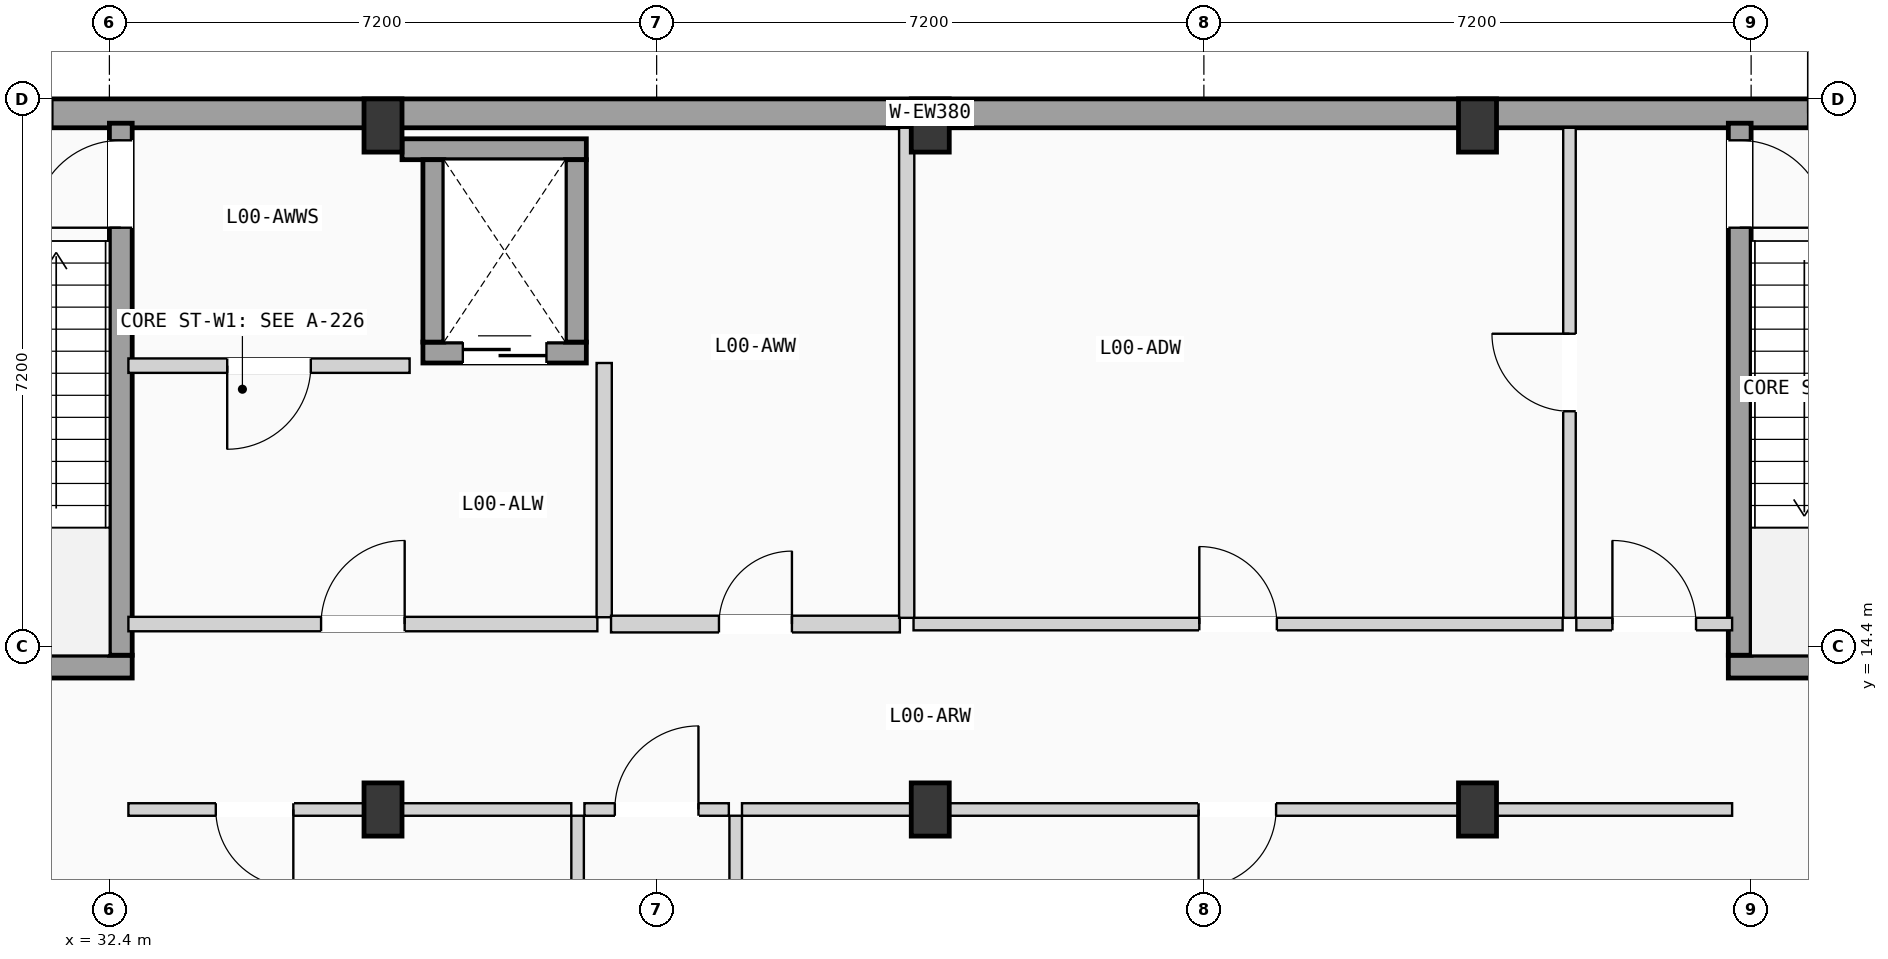
"""IFC4 building model, lengths in metres.
Left out: names, types, materials, properties, quantities, classifications, styles, units other than length and angle.
Written with IfcOpenShell. Run it as: python <this file> out.ifc"""

import sys

from ifc_helpers import new_model, si_unit, direction, frame, frame_2d, origin, origin_2d, place, context, subcontext, project, spatial, rectangle, extrude, element, fill, save


model = new_model("IFC4")
c1 = context("Model", 3, precision=1e-05, world=origin(), true_north=direction((0.0, 1.0)))
c2 = subcontext(c1, "Body", "Model", "MODEL_VIEW")
j1 = project(units=[si_unit("LENGTHUNIT", "METRE"), si_unit("PLANEANGLEUNIT", "RADIAN")], contexts=[c1])
p1 = place(None, origin())
s1 = spatial("IfcSite", under=j1, at=p1, CompositionType="ELEMENT")
p2 = place(p1, origin())
s2 = spatial("IfcBuilding", under=s1, at=p2, CompositionType="ELEMENT")
p3 = place(p2, origin())
s3 = spatial("IfcBuildingStorey", under=s2, at=p3, CompositionType="ELEMENT", Elevation=0.0)
for number, where, z_axis, x_axis in (
    (1, (36.0, 12.25, 0.0), (0.0, 0.0, 1.0), (1.0, 0.0, 0.0)),
    (2, (36.0, 21.25, 0.0), (0.0, 0.0, 1.0), (1.0, 0.0, 0.0)),
    (3, (43.2, 12.25, 0.0), (0.0, 0.0, 1.0), (1.0, 0.0, 0.0)),
    (4, (43.2, 21.25, 0.0), (0.0, 0.0, 1.0), (1.0, 0.0, 0.0)),
    (5, (50.4, 12.25, 0.0), (0.0, 0.0, 1.0), (1.0, 0.0, 0.0)),
    (6, (50.4, 21.25, 0.0), (0.0, 0.0, 1.0), (1.0, 0.0, 0.0)),
):
    element("IfcColumn", number, at=place(p3, frame(where, z_axis=z_axis, x_axis=x_axis)), inside=s3, PredefinedType="COLUMN", context=c2, shape_type="SweptSolid", body=[
        extrude(rectangle(XDim=0.5, YDim=0.7, at=origin_2d()), origin(), (0.0, 0.0, 1.0), 4.9),
    ])
p4 = place(p3, frame((28.8, 21.41, 0.0), z_axis=(0.0, 0.0, 1.0), x_axis=(1.0, 0.0, 0.0)))
e7 = element("IfcWall", 7, at=p4, inside=s3, PredefinedType="SOLIDWALL", context=c2, shape_type="SweptSolid", body=[
    extrude(rectangle(XDim=28.8, YDim=0.38, at=frame_2d((14.4, 0.0))), origin(), (0.0, 0.0, 1.0), 4.625),
])
p5 = place(p4, frame((1.55, 0.0, 0.0)))
e8 = element("IfcOpeningElement", 8, at=p5, cuts=e7, PredefinedType="OPENING", context=c2, shape_type="SweptSolid", body=[
    extrude(rectangle(XDim=1.3, YDim=2.2, at=frame_2d((0.65, 1.1))), frame((0.0, 0.2, 0.0), z_axis=(0.0, -1.0, 0.0), x_axis=(1.0, 0.0, 0.0)), (0.0, 0.0, 1.0), 0.4),
])
p6 = place(p4, frame((25.95, 0.0, 0.0)))
e9 = element("IfcOpeningElement", 9, at=p6, cuts=e7, PredefinedType="OPENING", context=c2, shape_type="SweptSolid", body=[
    extrude(rectangle(XDim=1.3, YDim=2.2, at=frame_2d((0.65, 1.1))), frame((0.0, 0.2, 0.0), z_axis=(0.0, -1.0, 0.0), x_axis=(1.0, 0.0, 0.0)), (0.0, 0.0, 1.0), 0.4),
])
p7 = place(p3, frame((29.1, 14.13, 0.0), z_axis=(0.0, 0.0, 1.0), x_axis=(1.0, 0.0, 0.0)))
e10 = element("IfcWall", 10, at=p7, inside=s3, PredefinedType="SHEAR", context=c2, shape_type="SweptSolid", body=[
    extrude(rectangle(XDim=3.6, YDim=0.3, at=frame_2d((1.8, 0.0))), origin(), (0.0, 0.0, 1.0), 4.625),
])
p8 = place(p3, frame((32.55, 14.28, 0.0), z_axis=(0.0, 0.0, 1.0), x_axis=(0.0, 1.0, 0.0)))
e11 = element("IfcWall", 11, at=p8, inside=s3, PredefinedType="SHEAR", context=c2, shape_type="SweptSolid", body=[
    extrude(rectangle(XDim=7.0, YDim=0.3, at=frame_2d((3.5, 0.0))), origin(), (0.0, 0.0, 1.0), 4.625),
])
p9 = place(p8, frame((5.625, 0.0, 0.0)))
e12 = element("IfcOpeningElement", 12, at=p9, cuts=e11, PredefinedType="OPENING", context=c2, shape_type="SweptSolid", body=[
    extrude(rectangle(XDim=1.15, YDim=2.12, at=frame_2d((0.575, 1.06))), frame((0.0, 0.16, 0.0), z_axis=(0.0, -1.0, 0.0), x_axis=(1.0, 0.0, 0.0)), (0.0, 0.0, 1.0), 0.32),
])
p10 = place(p3, frame((53.7, 14.13, 0.0), z_axis=(0.0, 0.0, 1.0), x_axis=(1.0, 0.0, 0.0)))
e13 = element("IfcWall", 13, at=p10, inside=s3, PredefinedType="SHEAR", context=c2, shape_type="SweptSolid", body=[
    extrude(rectangle(XDim=3.6, YDim=0.3, at=frame_2d((1.8, 0.0))), origin(), (0.0, 0.0, 1.0), 4.625),
])
p11 = place(p3, frame((53.85, 14.28, 0.0), z_axis=(0.0, 0.0, 1.0), x_axis=(0.0, 1.0, 0.0)))
e14 = element("IfcWall", 14, at=p11, inside=s3, PredefinedType="SHEAR", context=c2, shape_type="SweptSolid", body=[
    extrude(rectangle(XDim=7.0, YDim=0.3, at=frame_2d((3.5, 0.0))), origin(), (0.0, 0.0, 1.0), 4.625),
])
p12 = place(p11, frame((5.625, 0.0, 0.0)))
e15 = element("IfcOpeningElement", 15, at=p12, cuts=e14, PredefinedType="OPENING", context=c2, shape_type="SweptSolid", body=[
    extrude(rectangle(XDim=1.15, YDim=2.12, at=frame_2d((0.575, 1.06))), frame((0.0, 0.16, 0.0), z_axis=(0.0, -1.0, 0.0), x_axis=(1.0, 0.0, 0.0)), (0.0, 0.0, 1.0), 0.32),
])
p13 = place(p3, frame((36.525, 18.262, 0.0), z_axis=(0.0, 0.0, 1.0), x_axis=(1.0, 0.0, 0.0)))
e16 = element("IfcWall", 16, at=p13, inside=s3, PredefinedType="SHEAR", context=c2, shape_type="SweptSolid", body=[
    extrude(rectangle(XDim=2.15, YDim=0.275, at=frame_2d((1.075, 0.0))), origin(), (0.0, 0.0, 1.0), 4.625),
])
p14 = place(p13, frame((0.525, 0.0, 0.0)))
e17 = element("IfcOpeningElement", 17, at=p14, cuts=e16, PredefinedType="OPENING", context=c2, shape_type="SweptSolid", body=[
    extrude(rectangle(XDim=1.1, YDim=2.15, at=frame_2d((0.55, 1.075))), frame((0.0, 0.147, 0.0), z_axis=(0.0, -1.0, 0.0), x_axis=(1.0, 0.0, 0.0)), (0.0, 0.0, 1.0), 0.295),
])
p15 = place(p3, frame((36.25, 20.938, 0.0), z_axis=(0.0, 0.0, 1.0), x_axis=(1.0, 0.0, 0.0)))
e18 = element("IfcWall", 18, at=p15, inside=s3, PredefinedType="SHEAR", context=c2, shape_type="SweptSolid", body=[
    extrude(rectangle(XDim=2.425, YDim=0.275, at=frame_2d((1.212, 0.0))), origin(), (0.0, 0.0, 1.0), 4.625),
])
for number, where, z_axis, x_axis in (
    (19, (36.663, 18.4, 0.0), (0.0, 0.0, 1.0), (0.0, 1.0, 0.0)),
    (20, (38.538, 18.4, 0.0), (0.0, 0.0, 1.0), (0.0, 1.0, 0.0)),
):
    element("IfcWall", number, at=place(p3, frame(where, z_axis=z_axis, x_axis=x_axis)), inside=s3, PredefinedType="SHEAR", context=c2, shape_type="SweptSolid", body=[
        extrude(rectangle(XDim=2.4, YDim=0.275, at=frame_2d((1.2, 0.0))), origin(), (0.0, 0.0, 1.0), 4.625),
    ])
p16 = place(p3, frame((38.65, 12.25, 0.0), z_axis=(0.0, 0.0, 1.0), x_axis=(1.0, 0.0, 0.0)))
e21 = element("IfcWall", 21, at=p16, inside=s3, PredefinedType="PARTITIONING", context=c2, shape_type="SweptSolid", body=[
    extrude(rectangle(XDim=1.9, YDim=0.165, at=frame_2d((0.95, 0.0))), origin(), (0.0, 0.0, 1.0), 3.84),
])
p17 = place(p16, frame((0.4, 0.0, 0.0)))
e22 = element("IfcOpeningElement", 22, at=p17, cuts=e21, PredefinedType="OPENING", context=c2, shape_type="SweptSolid", body=[
    extrude(rectangle(XDim=1.1, YDim=2.12, at=frame_2d((0.55, 1.06))), frame((0.0, 0.093, 0.0), z_axis=(0.0, -1.0, 0.0), x_axis=(1.0, 0.0, 0.0)), (0.0, 0.0, 1.0), 0.185),
])
p18 = place(p3, frame((38.56, 4.14, 0.0), z_axis=(0.0, 0.0, 1.0), x_axis=(0.0, 1.0, 0.0)))
e23 = element("IfcWall", 23, at=p18, inside=s3, PredefinedType="PARTITIONING", context=c2, shape_type="SweptSolid", body=[
    extrude(rectangle(XDim=8.028, YDim=0.165, at=frame_2d((4.014, 0.0))), origin(), (0.0, 0.0, 1.0), 3.84),
])
p19 = place(p18, frame((3.5, 0.0, 0.0)))
e24 = element("IfcOpeningElement", 24, at=p19, cuts=e23, PredefinedType="OPENING", context=c2, shape_type="SweptSolid", body=[
    extrude(rectangle(XDim=1.02, YDim=2.16, at=frame_2d((0.51, 1.08))), frame((0.0, 0.093, 0.0), z_axis=(0.0, -1.0, 0.0), x_axis=(1.0, 0.0, 0.0)), (0.0, 0.0, 1.0), 0.185),
])
p20 = place(p3, frame((40.64, 4.14, 0.0), z_axis=(0.0, 0.0, 1.0), x_axis=(0.0, 1.0, 0.0)))
e25 = element("IfcWall", 25, at=p20, inside=s3, PredefinedType="PARTITIONING", context=c2, shape_type="SweptSolid", body=[
    extrude(rectangle(XDim=8.028, YDim=0.165, at=frame_2d((4.014, 0.0))), origin(), (0.0, 0.0, 1.0), 3.84),
])
p21 = place(p20, frame((3.5, 0.0, 0.0)))
e26 = element("IfcOpeningElement", 26, at=p21, cuts=e25, PredefinedType="OPENING", context=c2, shape_type="SweptSolid", body=[
    extrude(rectangle(XDim=1.02, YDim=2.16, at=frame_2d((0.51, 1.08))), frame((0.0, 0.093, 0.0), z_axis=(0.0, -1.0, 0.0), x_axis=(1.0, 0.0, 0.0)), (0.0, 0.0, 1.0), 0.185),
])
p22 = place(p3, frame((32.65, 18.09, 0.0), z_axis=(0.0, 0.0, 1.0), x_axis=(1.0, 0.0, 0.0)))
e27 = element("IfcWall", 27, at=p22, inside=s3, PredefinedType="PARTITIONING", context=c2, shape_type="SweptSolid", body=[
    extrude(rectangle(XDim=3.7, YDim=0.19, at=frame_2d((1.85, 0.0))), origin(), (0.0, 0.0, 1.0), 3.84),
])
p23 = place(p22, frame((1.3, 0.0, 0.0)))
e28 = element("IfcOpeningElement", 28, at=p23, cuts=e27, PredefinedType="OPENING", context=c2, shape_type="SweptSolid", body=[
    extrude(rectangle(XDim=1.1, YDim=2.12, at=frame_2d((0.55, 1.06))), frame((0.0, 0.105, 0.0), z_axis=(0.0, -1.0, 0.0), x_axis=(1.0, 0.0, 0.0)), (0.0, 0.0, 1.0), 0.21),
])
p24 = place(p3, frame((32.65, 14.69, 0.0), z_axis=(0.0, 0.0, 1.0), x_axis=(1.0, 0.0, 0.0)))
e29 = element("IfcWall", 29, at=p24, inside=s3, PredefinedType="PARTITIONING", context=c2, shape_type="SweptSolid", body=[
    extrude(rectangle(XDim=6.17, YDim=0.19, at=frame_2d((3.085, 0.0))), origin(), (0.0, 0.0, 1.0), 3.84),
])
p25 = place(p24, frame((2.535, 0.0, 0.0)))
e30 = element("IfcOpeningElement", 30, at=p25, cuts=e29, PredefinedType="OPENING", context=c2, shape_type="SweptSolid", body=[
    extrude(rectangle(XDim=1.1, YDim=2.12, at=frame_2d((0.55, 1.06))), frame((0.0, 0.105, 0.0), z_axis=(0.0, -1.0, 0.0), x_axis=(1.0, 0.0, 0.0)), (0.0, 0.0, 1.0), 0.21),
])
p26 = place(p3, frame((38.91, 14.78, 0.0), z_axis=(0.0, 0.0, 1.0), x_axis=(0.0, 1.0, 0.0)))
e31 = element("IfcWall", 31, at=p26, inside=s3, PredefinedType="PLUMBINGWALL", context=c2, shape_type="SweptSolid", body=[
    extrude(rectangle(XDim=3.345, YDim=0.2, at=frame_2d((1.672, 0.0))), origin(), (0.0, 0.0, 1.0), 3.84),
])
p27 = place(p3, frame((51.7, 14.69, 0.0), z_axis=(0.0, 0.0, 1.0), x_axis=(1.0, 0.0, 0.0)))
e32 = element("IfcWall", 32, at=p27, inside=s3, PredefinedType="PARTITIONING", context=c2, shape_type="SweptSolid", body=[
    extrude(rectangle(XDim=2.05, YDim=0.165, at=frame_2d((1.025, 0.0))), origin(), (0.0, 0.0, 1.0), 3.84),
])
p28 = place(p27, frame((0.475, 0.0, 0.0)))
e33 = element("IfcOpeningElement", 33, at=p28, cuts=e32, PredefinedType="OPENING", context=c2, shape_type="SweptSolid", body=[
    extrude(rectangle(XDim=1.1, YDim=2.12, at=frame_2d((0.55, 1.06))), frame((0.0, 0.093, 0.0), z_axis=(0.0, -1.0, 0.0), x_axis=(1.0, 0.0, 0.0)), (0.0, 0.0, 1.0), 0.185),
])
p29 = place(p3, frame((32.65, 12.25, 0.0), z_axis=(0.0, 0.0, 1.0), x_axis=(1.0, 0.0, 0.0)))
e34 = element("IfcWall", 34, at=p29, inside=s3, PredefinedType="PARTITIONING", context=c2, shape_type="SweptSolid", body=[
    extrude(rectangle(XDim=5.827, YDim=0.165, at=frame_2d((2.914, 0.0))), origin(), (0.0, 0.0, 1.0), 3.84),
])
p30 = place(p29, frame((1.15, 0.0, 0.0)))
e35 = element("IfcOpeningElement", 35, at=p30, cuts=e34, PredefinedType="OPENING", context=c2, shape_type="SweptSolid", body=[
    extrude(rectangle(XDim=1.02, YDim=2.16, at=frame_2d((0.51, 1.08))), frame((0.0, 0.093, 0.0), z_axis=(0.0, -1.0, 0.0), x_axis=(1.0, 0.0, 0.0)), (0.0, 0.0, 1.0), 0.185),
])
p31 = place(p3, frame((40.723, 12.25, 0.0), z_axis=(0.0, 0.0, 1.0), x_axis=(1.0, 0.0, 0.0)))
e36 = element("IfcWall", 36, at=p31, inside=s3, PredefinedType="PARTITIONING", context=c2, shape_type="SweptSolid", body=[
    extrude(rectangle(XDim=13.027, YDim=0.165, at=frame_2d((6.514, 0.0))), origin(), (0.0, 0.0, 1.0), 3.84),
])
p32 = place(p31, frame((6.007, 0.0, 0.0)))
e37 = element("IfcOpeningElement", 37, at=p32, cuts=e36, PredefinedType="OPENING", context=c2, shape_type="SweptSolid", body=[
    extrude(rectangle(XDim=1.02, YDim=2.16, at=frame_2d((0.51, 1.08))), frame((0.0, 0.093, 0.0), z_axis=(0.0, -1.0, 0.0), x_axis=(1.0, 0.0, 0.0)), (0.0, 0.0, 1.0), 0.185),
])
p33 = place(p3, frame((39.0, 14.69, 0.0), z_axis=(0.0, 0.0, 1.0), x_axis=(1.0, 0.0, 0.0)))
e38 = element("IfcWall", 38, at=p33, inside=s3, PredefinedType="PLUMBINGWALL", context=c2, shape_type="SweptSolid", body=[
    extrude(rectangle(XDim=3.8, YDim=0.22, at=frame_2d((1.9, 0.0))), origin(), (0.0, 0.0, 1.0), 3.84),
])
p34 = place(p33, frame((1.42, 0.0, 0.0)))
e39 = element("IfcOpeningElement", 39, at=p34, cuts=e38, PredefinedType="OPENING", context=c2, shape_type="SweptSolid", body=[
    extrude(rectangle(XDim=0.96, YDim=2.05, at=frame_2d((0.48, 1.025))), frame((0.0, 0.12, 0.0), z_axis=(0.0, -1.0, 0.0), x_axis=(1.0, 0.0, 0.0)), (0.0, 0.0, 1.0), 0.24),
])
p35 = place(p3, frame((42.98, 14.69, 0.0), z_axis=(0.0, 0.0, 1.0), x_axis=(1.0, 0.0, 0.0)))
e40 = element("IfcWall", 40, at=p35, inside=s3, PredefinedType="PARTITIONING", context=c2, shape_type="SweptSolid", body=[
    extrude(rectangle(XDim=8.54, YDim=0.165, at=frame_2d((4.27, 0.0))), origin(), (0.0, 0.0, 1.0), 3.84),
])
p36 = place(p35, frame((3.76, 0.0, 0.0)))
e41 = element("IfcOpeningElement", 41, at=p36, cuts=e40, PredefinedType="OPENING", context=c2, shape_type="SweptSolid", body=[
    extrude(rectangle(XDim=1.02, YDim=2.16, at=frame_2d((0.51, 1.08))), frame((0.0, 0.093, 0.0), z_axis=(0.0, -1.0, 0.0), x_axis=(1.0, 0.0, 0.0)), (0.0, 0.0, 1.0), 0.185),
])
p37 = place(p3, frame((51.61, 14.772, 0.0), z_axis=(0.0, 0.0, 1.0), x_axis=(0.0, 1.0, 0.0)))
e42 = element("IfcWall", 42, at=p37, inside=s3, PredefinedType="PARTITIONING", context=c2, shape_type="SweptSolid", body=[
    extrude(rectangle(XDim=6.448, YDim=0.165, at=frame_2d((3.224, 0.0))), origin(), (0.0, 0.0, 1.0), 3.84),
])
p38 = place(p37, frame((2.718, 0.0, 0.0)))
e43 = element("IfcOpeningElement", 43, at=p38, cuts=e42, PredefinedType="OPENING", context=c2, shape_type="SweptSolid", body=[
    extrude(rectangle(XDim=1.02, YDim=2.16, at=frame_2d((0.51, 1.08))), frame((0.0, 0.093, 0.0), z_axis=(0.0, -1.0, 0.0), x_axis=(1.0, 0.0, 0.0)), (0.0, 0.0, 1.0), 0.185),
])
p39 = place(p3, frame((42.89, 14.772, 0.0), z_axis=(0.0, 0.0, 1.0), x_axis=(0.0, 1.0, 0.0)))
e44 = element("IfcWall", 44, at=p39, inside=s3, PredefinedType="PLUMBINGWALL", context=c2, shape_type="SweptSolid", body=[
    extrude(rectangle(XDim=6.448, YDim=0.2, at=frame_2d((3.224, 0.0))), origin(), (0.0, 0.0, 1.0), 3.84),
])
p40 = place(p5, origin())
e45 = element("IfcDoor", 45, at=p40, inside=s3, OperationType="SINGLE_SWING_LEFT", PredefinedType="DOOR", context=c2, shape_type="SweptSolid", body=[
    extrude(rectangle(XDim=1.3, YDim=2.2, at=frame_2d((0.65, 1.1))), frame((0.0, 0.025, 0.0), z_axis=(0.0, -1.0, 0.0), x_axis=(1.0, 0.0, 0.0)), (0.0, 0.0, 1.0), 0.05),
])
fill(e8, e45)
p41 = place(p6, origin())
e46 = element("IfcDoor", 46, at=p41, inside=s3, OperationType="SINGLE_SWING_LEFT", PredefinedType="DOOR", context=c2, shape_type="SweptSolid", body=[
    extrude(rectangle(XDim=1.3, YDim=2.2, at=frame_2d((0.65, 1.1))), frame((0.0, 0.025, 0.0), z_axis=(0.0, -1.0, 0.0), x_axis=(1.0, 0.0, 0.0)), (0.0, 0.0, 1.0), 0.05),
])
fill(e9, e46)
p42 = place(p9, origin())
e47 = element("IfcDoor", 47, at=p42, inside=s3, OperationType="SINGLE_SWING_LEFT", PredefinedType="DOOR", context=c2, shape_type="SweptSolid", body=[
    extrude(rectangle(XDim=1.15, YDim=2.12, at=frame_2d((0.575, 1.06))), frame((0.0, 0.025, 0.0), z_axis=(0.0, -1.0, 0.0), x_axis=(1.0, 0.0, 0.0)), (0.0, 0.0, 1.0), 0.05),
])
fill(e12, e47)
p43 = place(p12, frame((1.15, 0.0, 0.0), z_axis=(0.0, 0.0, 1.0), x_axis=(-1.0, 0.0, 0.0)))
e48 = element("IfcDoor", 48, at=p43, inside=s3, OperationType="SINGLE_SWING_LEFT", PredefinedType="DOOR", context=c2, shape_type="SweptSolid", body=[
    extrude(rectangle(XDim=1.15, YDim=2.12, at=frame_2d((0.575, 1.06))), frame((0.0, 0.025, 0.0), z_axis=(0.0, -1.0, 0.0), x_axis=(1.0, 0.0, 0.0)), (0.0, 0.0, 1.0), 0.05),
])
fill(e15, e48)
p44 = place(p14, origin())
e49 = element("IfcDoor", 49, at=p44, inside=s3, OperationType="SLIDING_TO_LEFT", PredefinedType="DOOR", context=c2, shape_type="SweptSolid", body=[
    extrude(rectangle(XDim=1.1, YDim=2.15, at=frame_2d((0.55, 1.075))), frame((0.0, 0.025, 0.0), z_axis=(0.0, -1.0, 0.0), x_axis=(1.0, 0.0, 0.0)), (0.0, 0.0, 1.0), 0.05),
])
fill(e17, e49)
p45 = place(p17, origin())
e50 = element("IfcDoor", 50, at=p45, inside=s3, OperationType="SINGLE_SWING_RIGHT", PredefinedType="DOOR", context=c2, shape_type="SweptSolid", body=[
    extrude(rectangle(XDim=1.1, YDim=2.12, at=frame_2d((0.55, 1.06))), frame((0.0, 0.025, 0.0), z_axis=(0.0, -1.0, 0.0), x_axis=(1.0, 0.0, 0.0)), (0.0, 0.0, 1.0), 0.05),
])
fill(e22, e50)
p46 = place(p23, frame((1.1, 0.0, 0.0), z_axis=(0.0, 0.0, 1.0), x_axis=(-1.0, 0.0, 0.0)))
e51 = element("IfcDoor", 51, at=p46, inside=s3, OperationType="SINGLE_SWING_LEFT", PredefinedType="DOOR", context=c2, shape_type="SweptSolid", body=[
    extrude(rectangle(XDim=1.1, YDim=2.12, at=frame_2d((0.55, 1.06))), frame((0.0, 0.025, 0.0), z_axis=(0.0, -1.0, 0.0), x_axis=(1.0, 0.0, 0.0)), (0.0, 0.0, 1.0), 0.05),
])
fill(e28, e51)
p47 = place(p25, origin())
e52 = element("IfcDoor", 52, at=p47, inside=s3, OperationType="SINGLE_SWING_RIGHT", PredefinedType="DOOR", context=c2, shape_type="SweptSolid", body=[
    extrude(rectangle(XDim=1.1, YDim=2.12, at=frame_2d((0.55, 1.06))), frame((0.0, 0.025, 0.0), z_axis=(0.0, -1.0, 0.0), x_axis=(1.0, 0.0, 0.0)), (0.0, 0.0, 1.0), 0.05),
])
fill(e30, e52)
p48 = place(p28, origin())
e53 = element("IfcDoor", 53, at=p48, inside=s3, OperationType="SINGLE_SWING_LEFT", PredefinedType="DOOR", context=c2, shape_type="SweptSolid", body=[
    extrude(rectangle(XDim=1.1, YDim=2.12, at=frame_2d((0.55, 1.06))), frame((0.0, 0.025, 0.0), z_axis=(0.0, -1.0, 0.0), x_axis=(1.0, 0.0, 0.0)), (0.0, 0.0, 1.0), 0.05),
])
fill(e33, e53)
p49 = place(p30, frame((1.02, 0.0, 0.0), z_axis=(0.0, 0.0, 1.0), x_axis=(-1.0, 0.0, 0.0)))
e54 = element("IfcDoor", 54, at=p49, inside=s3, OperationType="SINGLE_SWING_RIGHT", PredefinedType="DOOR", context=c2, shape_type="SweptSolid", body=[
    extrude(rectangle(XDim=1.02, YDim=2.16, at=frame_2d((0.51, 1.08))), frame((0.0, 0.025, 0.0), z_axis=(0.0, -1.0, 0.0), x_axis=(1.0, 0.0, 0.0)), (0.0, 0.0, 1.0), 0.05),
])
fill(e35, e54)
p50 = place(p32, frame((1.02, 0.0, 0.0), z_axis=(0.0, 0.0, 1.0), x_axis=(-1.0, 0.0, 0.0)))
e55 = element("IfcDoor", 55, at=p50, inside=s3, OperationType="SINGLE_SWING_LEFT", PredefinedType="DOOR", context=c2, shape_type="SweptSolid", body=[
    extrude(rectangle(XDim=1.02, YDim=2.16, at=frame_2d((0.51, 1.08))), frame((0.0, 0.025, 0.0), z_axis=(0.0, -1.0, 0.0), x_axis=(1.0, 0.0, 0.0)), (0.0, 0.0, 1.0), 0.05),
])
fill(e37, e55)
p51 = place(p34, origin())
e56 = element("IfcDoor", 56, at=p51, inside=s3, OperationType="SINGLE_SWING_RIGHT", PredefinedType="DOOR", context=c2, shape_type="SweptSolid", body=[
    extrude(rectangle(XDim=0.96, YDim=2.05, at=frame_2d((0.48, 1.025))), frame((0.0, 0.025, 0.0), z_axis=(0.0, -1.0, 0.0), x_axis=(1.0, 0.0, 0.0)), (0.0, 0.0, 1.0), 0.05),
])
fill(e39, e56)
p52 = place(p36, origin())
e57 = element("IfcDoor", 57, at=p52, inside=s3, OperationType="SINGLE_SWING_LEFT", PredefinedType="DOOR", context=c2, shape_type="SweptSolid", body=[
    extrude(rectangle(XDim=1.02, YDim=2.16, at=frame_2d((0.51, 1.08))), frame((0.0, 0.025, 0.0), z_axis=(0.0, -1.0, 0.0), x_axis=(1.0, 0.0, 0.0)), (0.0, 0.0, 1.0), 0.05),
])
fill(e41, e57)
p53 = place(p38, origin())
e58 = element("IfcDoor", 58, at=p53, inside=s3, OperationType="SINGLE_SWING_RIGHT", PredefinedType="DOOR", context=c2, shape_type="SweptSolid", body=[
    extrude(rectangle(XDim=1.02, YDim=2.16, at=frame_2d((0.51, 1.08))), frame((0.0, 0.025, 0.0), z_axis=(0.0, -1.0, 0.0), x_axis=(1.0, 0.0, 0.0)), (0.0, 0.0, 1.0), 0.05),
])
fill(e43, e58)
save(model, sys.argv[1])
